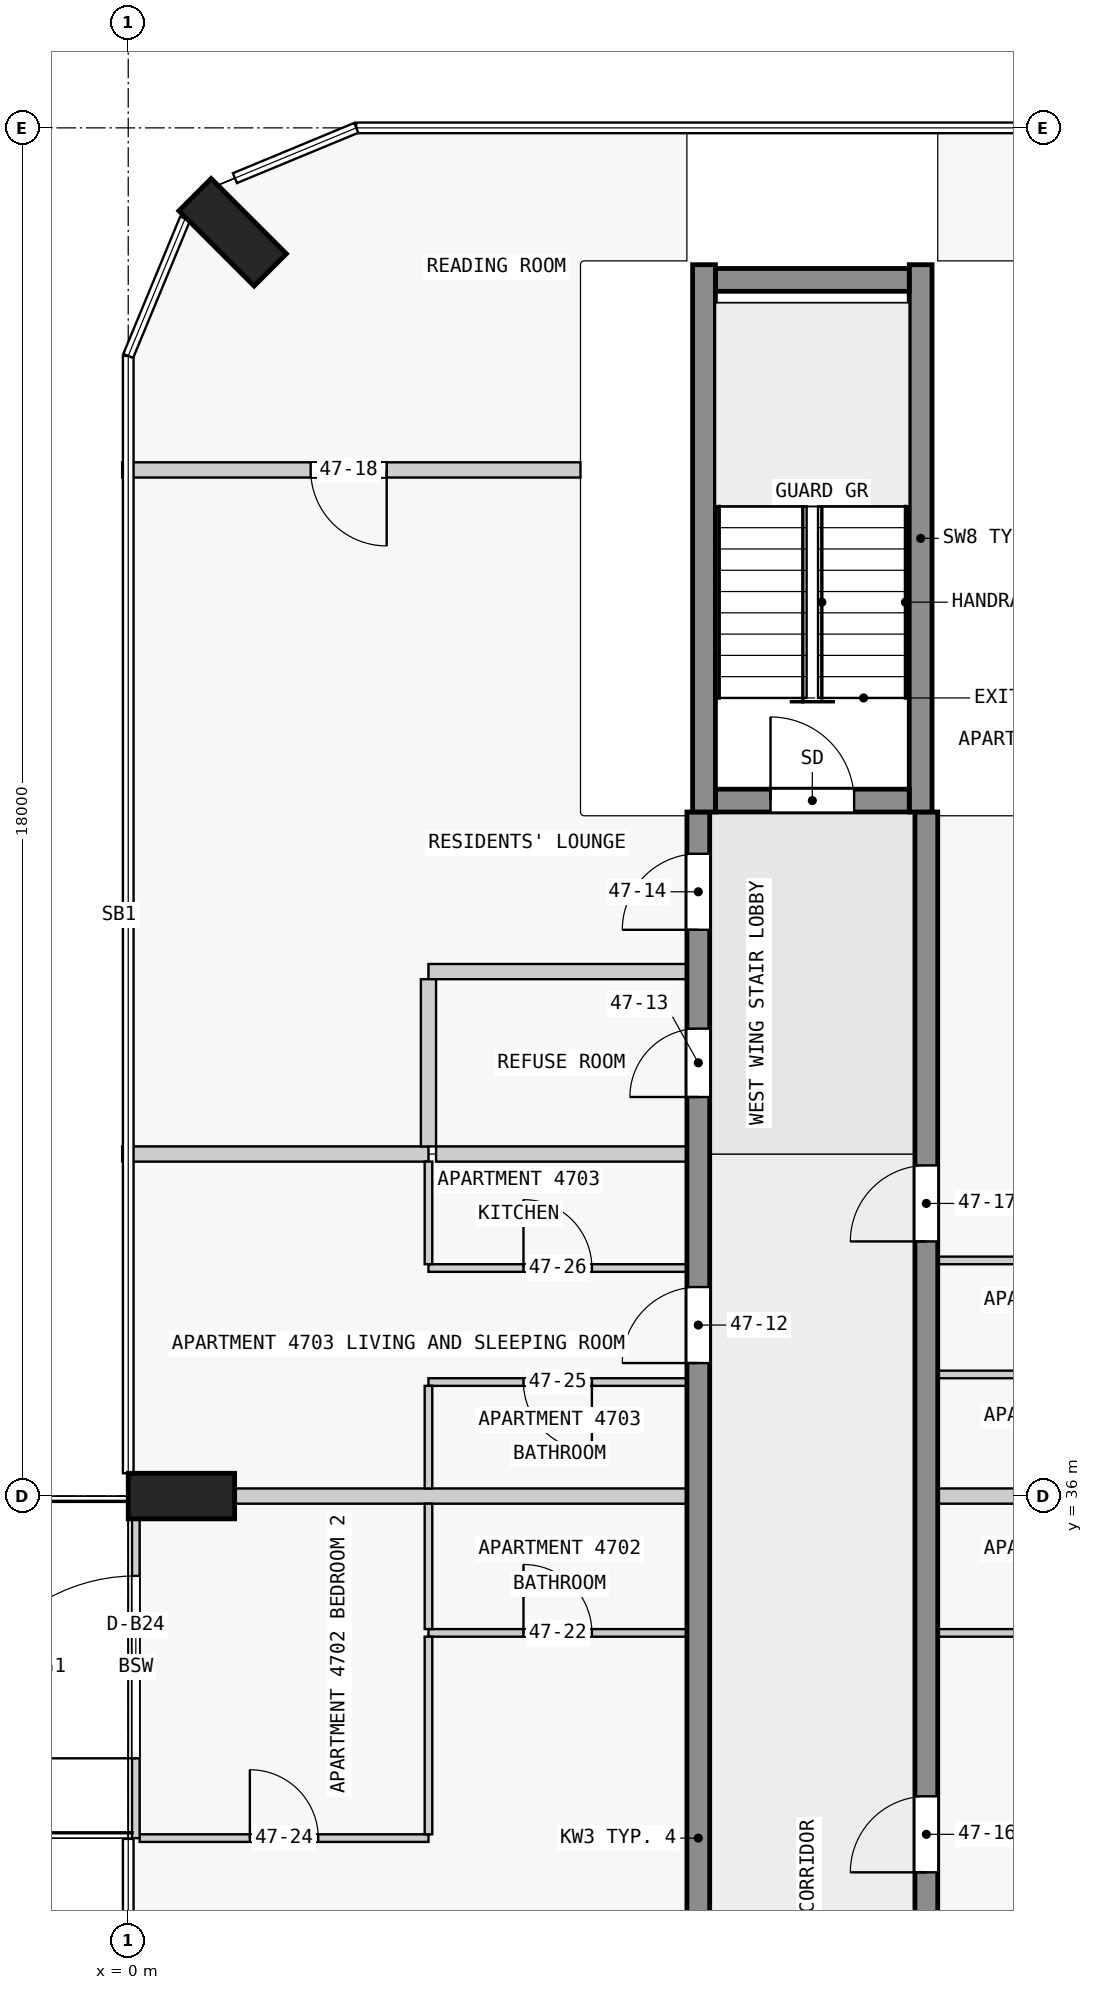
"""IFC4 building model, lengths in metres.
Left out: names, types, materials, properties, quantities, classifications, styles, units other than length and angle.
Written with IfcOpenShell. Run it as: python <this file> out.ifc"""

import sys

from ifc_helpers import new_model, si_unit, direction, frame, frame_2d, origin, origin_2d, place, context, subcontext, project, spatial, rectangle, extrude, element, fill, save


model = new_model("IFC4")
c1 = context("Model", 3, precision=1e-05, world=origin(), true_north=direction((0.0, 1.0)))
c2 = subcontext(c1, "Body", "Model", "MODEL_VIEW")
j1 = project(units=[si_unit("LENGTHUNIT", "METRE"), si_unit("PLANEANGLEUNIT", "RADIAN")], contexts=[c1])
p1 = place(None, origin())
s1 = spatial("IfcSite", under=j1, at=p1, CompositionType="ELEMENT")
p2 = place(p1, origin())
s2 = spatial("IfcBuilding", under=s1, at=p2, CompositionType="ELEMENT")
p3 = place(p2, frame((0.0, 0.0, 181.4)))
s3 = spatial("IfcBuildingStorey", under=s2, at=p3, CompositionType="ELEMENT", Elevation=181.4)
for number, where, z_axis, x_axis in (
    (1, (1.374, 52.626, 0.0), (0.0, 0.0, 1.0), (0.707, 0.707, 0.0)),
    (2, (0.7, 36.0, 0.0), (0.0, 0.0, 1.0), (0.0, 1.0, 0.0)),
):
    element("IfcColumn", number, at=place(p3, frame(where, z_axis=z_axis, x_axis=x_axis)), inside=s3, PredefinedType="COLUMN", context=c2, shape_type="SweptSolid", body=[
        extrude(rectangle(XDim=0.6, YDim=1.4, at=origin_2d()), origin(), (0.0, 0.0, 1.0), 3.5),
    ])
p4 = place(p3, frame((7.725, 45.15, 0.0), z_axis=(0.0, 0.0, 1.0), x_axis=(1.0, 0.0, 0.0)))
e3 = element("IfcWall", 3, at=p4, inside=s3, PredefinedType="SHEAR", context=c2, shape_type="SweptSolid", body=[
    extrude(rectangle(XDim=2.55, YDim=0.3, at=frame_2d((1.275, 0.0))), origin(), (0.0, 0.0, 1.0), 3.5),
])
p5 = place(p4, frame((0.725, 0.0, 0.0)))
e4 = element("IfcOpeningElement", 4, at=p5, cuts=e3, PredefinedType="OPENING", context=c2, shape_type="SweptSolid", body=[
    extrude(rectangle(XDim=1.1, YDim=2.1, at=frame_2d((0.55, 1.05))), frame((0.0, 0.16, 0.0), z_axis=(0.0, -1.0, 0.0), x_axis=(1.0, 0.0, 0.0)), (0.0, 0.0, 1.0), 0.32),
])
p6 = place(p3, frame((7.725, 52.0, 0.0), z_axis=(0.0, 0.0, 1.0), x_axis=(1.0, 0.0, 0.0)))
e5 = element("IfcWall", 5, at=p6, inside=s3, PredefinedType="SHEAR", context=c2, shape_type="SweptSolid", body=[
    extrude(rectangle(XDim=2.55, YDim=0.3, at=frame_2d((1.275, 0.0))), origin(), (0.0, 0.0, 1.0), 3.5),
])
for number, where, z_axis, x_axis in (
    (6, (7.575, 45.0, 0.0), (0.0, 0.0, 1.0), (0.0, 1.0, 0.0)),
    (7, (10.425, 45.0, 0.0), (0.0, 0.0, 1.0), (0.0, 1.0, 0.0)),
):
    element("IfcWall", number, at=place(p3, frame(where, z_axis=z_axis, x_axis=x_axis)), inside=s3, PredefinedType="SHEAR", context=c2, shape_type="SweptSolid", body=[
        extrude(rectangle(XDim=7.2, YDim=0.3, at=frame_2d((3.6, 0.0))), origin(), (0.0, 0.0, 1.0), 3.5),
    ])
p7 = place(p3, frame((7.5, 18.0, 0.0), z_axis=(0.0, 0.0, 1.0), x_axis=(0.0, 1.0, 0.0)))
e8 = element("IfcWall", 8, at=p7, inside=s3, PredefinedType="SHEAR", context=c2, shape_type="SweptSolid", body=[
    extrude(rectangle(XDim=27.0, YDim=0.3, at=frame_2d((13.5, 0.0))), origin(), (0.0, 0.0, 1.0), 3.2),
])
p8 = place(p7, frame((1.75, 0.0, 0.0)))
e9 = element("IfcOpeningElement", 9, at=p8, cuts=e8, PredefinedType="OPENING", context=c2, shape_type="SweptSolid", body=[
    extrude(rectangle(XDim=1.0, YDim=2.1, at=frame_2d((0.5, 1.05))), frame((0.0, 0.16, 0.0), z_axis=(0.0, -1.0, 0.0), x_axis=(1.0, 0.0, 0.0)), (0.0, 0.0, 1.0), 0.32),
])
p9 = place(p7, frame((11.45, 0.0, 0.0)))
e10 = element("IfcOpeningElement", 10, at=p9, cuts=e8, PredefinedType="OPENING", context=c2, shape_type="SweptSolid", body=[
    extrude(rectangle(XDim=1.0, YDim=2.1, at=frame_2d((0.5, 1.05))), frame((0.0, 0.16, 0.0), z_axis=(0.0, -1.0, 0.0), x_axis=(1.0, 0.0, 0.0)), (0.0, 0.0, 1.0), 0.32),
])
p10 = place(p7, frame((19.75, 0.0, 0.0)))
e11 = element("IfcOpeningElement", 11, at=p10, cuts=e8, PredefinedType="OPENING", context=c2, shape_type="SweptSolid", body=[
    extrude(rectangle(XDim=1.0, YDim=2.1, at=frame_2d((0.5, 1.05))), frame((0.0, 0.16, 0.0), z_axis=(0.0, -1.0, 0.0), x_axis=(1.0, 0.0, 0.0)), (0.0, 0.0, 1.0), 0.32),
])
p11 = place(p7, frame((23.25, 0.0, 0.0)))
e12 = element("IfcOpeningElement", 12, at=p11, cuts=e8, PredefinedType="OPENING", context=c2, shape_type="SweptSolid", body=[
    extrude(rectangle(XDim=0.9, YDim=2.1, at=frame_2d((0.45, 1.05))), frame((0.0, 0.16, 0.0), z_axis=(0.0, -1.0, 0.0), x_axis=(1.0, 0.0, 0.0)), (0.0, 0.0, 1.0), 0.32),
])
p12 = place(p7, frame((25.45, 0.0, 0.0)))
e13 = element("IfcOpeningElement", 13, at=p12, cuts=e8, PredefinedType="OPENING", context=c2, shape_type="SweptSolid", body=[
    extrude(rectangle(XDim=1.0, YDim=2.1, at=frame_2d((0.5, 1.05))), frame((0.0, 0.16, 0.0), z_axis=(0.0, -1.0, 0.0), x_axis=(1.0, 0.0, 0.0)), (0.0, 0.0, 1.0), 0.32),
])
p13 = place(p3, frame((10.5, 18.0, 0.0), z_axis=(0.0, 0.0, 1.0), x_axis=(0.0, 1.0, 0.0)))
e14 = element("IfcWall", 14, at=p13, inside=s3, PredefinedType="SHEAR", context=c2, shape_type="SweptSolid", body=[
    extrude(rectangle(XDim=27.0, YDim=0.3, at=frame_2d((13.5, 0.0))), origin(), (0.0, 0.0, 1.0), 3.2),
])
p14 = place(p13, frame((4.05, 0.0, 0.0)))
e15 = element("IfcOpeningElement", 15, at=p14, cuts=e14, PredefinedType="OPENING", context=c2, shape_type="SweptSolid", body=[
    extrude(rectangle(XDim=1.0, YDim=2.1, at=frame_2d((0.5, 1.05))), frame((0.0, 0.16, 0.0), z_axis=(0.0, -1.0, 0.0), x_axis=(1.0, 0.0, 0.0)), (0.0, 0.0, 1.0), 0.32),
])
p15 = place(p13, frame((13.05, 0.0, 0.0)))
e16 = element("IfcOpeningElement", 16, at=p15, cuts=e14, PredefinedType="OPENING", context=c2, shape_type="SweptSolid", body=[
    extrude(rectangle(XDim=1.0, YDim=2.1, at=frame_2d((0.5, 1.05))), frame((0.0, 0.16, 0.0), z_axis=(0.0, -1.0, 0.0), x_axis=(1.0, 0.0, 0.0)), (0.0, 0.0, 1.0), 0.32),
])
p16 = place(p13, frame((21.35, 0.0, 0.0)))
e17 = element("IfcOpeningElement", 17, at=p16, cuts=e14, PredefinedType="OPENING", context=c2, shape_type="SweptSolid", body=[
    extrude(rectangle(XDim=1.0, YDim=2.1, at=frame_2d((0.5, 1.05))), frame((0.0, 0.16, 0.0), z_axis=(0.0, -1.0, 0.0), x_axis=(1.0, 0.0, 0.0)), (0.0, 0.0, 1.0), 0.32),
])
p17 = place(p3, frame((0.1, 31.5, 0.0), z_axis=(0.0, 0.0, 1.0), x_axis=(0.0, 1.0, 0.0)))
e18 = element("IfcWall", 18, at=p17, inside=s3, PredefinedType="STANDARD", context=c2, shape_type="SweptSolid", body=[
    extrude(rectangle(XDim=4.5, YDim=0.1, at=frame_2d((2.25, 0.0))), origin(), (0.0, 0.0, 1.0), 3.2),
])
p18 = place(p17, frame((1.05, 0.0, 0.0)))
e19 = element("IfcOpeningElement", 19, at=p18, cuts=e18, PredefinedType="OPENING", context=c2, shape_type="SweptSolid", body=[
    extrude(rectangle(XDim=2.4, YDim=2.4, at=frame_2d((1.2, 1.2))), frame((0.0, 0.06, 0.0), z_axis=(0.0, -1.0, 0.0), x_axis=(1.0, 0.0, 0.0)), (0.0, 0.0, 1.0), 0.12),
])
p19 = place(p3, frame((0.15, 31.5, 0.0), z_axis=(0.0, 0.0, 1.0), x_axis=(1.0, 0.0, 0.0)))
e20 = element("IfcWall", 20, at=p19, inside=s3, PredefinedType="PARTITIONING", context=c2, shape_type="SweptSolid", body=[
    extrude(rectangle(XDim=3.8, YDim=0.1, at=frame_2d((1.9, 0.0))), origin(), (0.0, 0.0, 1.0), 3.2),
])
p20 = place(p19, frame((1.45, 0.0, 0.0)))
e21 = element("IfcOpeningElement", 21, at=p20, cuts=e20, PredefinedType="OPENING", context=c2, shape_type="SweptSolid", body=[
    extrude(rectangle(XDim=0.9, YDim=2.1, at=frame_2d((0.45, 1.05))), frame((0.0, 0.06, 0.0), z_axis=(0.0, -1.0, 0.0), x_axis=(1.0, 0.0, 0.0)), (0.0, 0.0, 1.0), 0.12),
])
p21 = place(p3, frame((3.95, 34.2, 0.0), z_axis=(0.0, 0.0, 1.0), x_axis=(1.0, 0.0, 0.0)))
e22 = element("IfcWall", 22, at=p21, inside=s3, PredefinedType="PARTITIONING", context=c2, shape_type="SweptSolid", body=[
    extrude(rectangle(XDim=3.4, YDim=0.1, at=frame_2d((1.7, 0.0))), origin(), (0.0, 0.0, 1.0), 3.2),
])
p22 = place(p21, frame((1.25, 0.0, 0.0)))
e23 = element("IfcOpeningElement", 23, at=p22, cuts=e22, PredefinedType="OPENING", context=c2, shape_type="SweptSolid", body=[
    extrude(rectangle(XDim=0.9, YDim=2.1, at=frame_2d((0.45, 1.05))), frame((0.0, 0.06, 0.0), z_axis=(0.0, -1.0, 0.0), x_axis=(1.0, 0.0, 0.0)), (0.0, 0.0, 1.0), 0.12),
])
p23 = place(p3, frame((10.65, 34.2, 0.0), z_axis=(0.0, 0.0, 1.0), x_axis=(1.0, 0.0, 0.0)))
e24 = element("IfcWall", 24, at=p23, inside=s3, PredefinedType="PARTITIONING", context=c2, shape_type="SweptSolid", body=[
    extrude(rectangle(XDim=3.35, YDim=0.1, at=frame_2d((1.675, 0.0))), origin(), (0.0, 0.0, 1.0), 3.2),
])
p24 = place(p23, frame((1.25, 0.0, 0.0)))
e25 = element("IfcOpeningElement", 25, at=p24, cuts=e24, PredefinedType="OPENING", context=c2, shape_type="SweptSolid", body=[
    extrude(rectangle(XDim=0.9, YDim=2.1, at=frame_2d((0.45, 1.05))), frame((0.0, 0.06, 0.0), z_axis=(0.0, -1.0, 0.0), x_axis=(1.0, 0.0, 0.0)), (0.0, 0.0, 1.0), 0.12),
])
for number, where, z_axis, x_axis in (
    (26, (7.35, 36.0, 0.0), (0.0, 0.0, 1.0), (-1.0, 0.0, 0.0)),
    (27, (16.6, 36.0, 0.0), (0.0, 0.0, 1.0), (-1.0, 0.0, 0.0)),
):
    element("IfcWall", number, at=place(p3, frame(where, z_axis=z_axis, x_axis=x_axis)), inside=s3, PredefinedType="PARTITIONING", context=c2, shape_type="SweptSolid", body=[
        extrude(rectangle(XDim=5.95, YDim=0.2, at=frame_2d((2.975, 0.0))), origin(), (0.0, 0.0, 1.0), 3.2),
    ])
p25 = place(p3, frame((7.35, 37.5, 0.0), z_axis=(0.0, 0.0, 1.0), x_axis=(-1.0, 0.0, 0.0)))
e28 = element("IfcWall", 28, at=p25, inside=s3, PredefinedType="PARTITIONING", context=c2, shape_type="SweptSolid", body=[
    extrude(rectangle(XDim=3.4, YDim=0.1, at=frame_2d((1.7, 0.0))), origin(), (0.0, 0.0, 1.0), 3.2),
])
p26 = place(p25, frame((1.25, 0.0, 0.0)))
e29 = element("IfcOpeningElement", 29, at=p26, cuts=e28, PredefinedType="OPENING", context=c2, shape_type="SweptSolid", body=[
    extrude(rectangle(XDim=0.9, YDim=2.1, at=frame_2d((0.45, 1.05))), frame((0.0, 0.06, 0.0), z_axis=(0.0, -1.0, 0.0), x_axis=(1.0, 0.0, 0.0)), (0.0, 0.0, 1.0), 0.12),
])
p27 = place(p3, frame((14.0, 37.6, 0.0), z_axis=(0.0, 0.0, 1.0), x_axis=(-1.0, 0.0, 0.0)))
e30 = element("IfcWall", 30, at=p27, inside=s3, PredefinedType="PARTITIONING", context=c2, shape_type="SweptSolid", body=[
    extrude(rectangle(XDim=3.35, YDim=0.1, at=frame_2d((1.675, 0.0))), origin(), (0.0, 0.0, 1.0), 3.2),
])
p28 = place(p3, frame((3.95, 39.0, 0.0), z_axis=(0.0, 0.0, 1.0), x_axis=(1.0, 0.0, 0.0)))
e31 = element("IfcWall", 31, at=p28, inside=s3, PredefinedType="PARTITIONING", context=c2, shape_type="SweptSolid", body=[
    extrude(rectangle(XDim=3.4, YDim=0.1, at=frame_2d((1.7, 0.0))), origin(), (0.0, 0.0, 1.0), 3.2),
])
p29 = place(p28, frame((1.25, 0.0, 0.0)))
e32 = element("IfcOpeningElement", 32, at=p29, cuts=e31, PredefinedType="OPENING", context=c2, shape_type="SweptSolid", body=[
    extrude(rectangle(XDim=0.9, YDim=2.1, at=frame_2d((0.45, 1.05))), frame((0.0, 0.06, 0.0), z_axis=(0.0, -1.0, 0.0), x_axis=(1.0, 0.0, 0.0)), (0.0, 0.0, 1.0), 0.12),
])
p30 = place(p3, frame((14.0, 39.1, 0.0), z_axis=(0.0, 0.0, 1.0), x_axis=(-1.0, 0.0, 0.0)))
e33 = element("IfcWall", 33, at=p30, inside=s3, PredefinedType="PARTITIONING", context=c2, shape_type="SweptSolid", body=[
    extrude(rectangle(XDim=3.35, YDim=0.1, at=frame_2d((1.675, 0.0))), origin(), (0.0, 0.0, 1.0), 3.2),
])
p31 = place(p30, frame((1.25, 0.0, 0.0)))
e34 = element("IfcOpeningElement", 34, at=p31, cuts=e33, PredefinedType="OPENING", context=c2, shape_type="SweptSolid", body=[
    extrude(rectangle(XDim=0.9, YDim=2.1, at=frame_2d((0.45, 1.05))), frame((0.0, 0.06, 0.0), z_axis=(0.0, -1.0, 0.0), x_axis=(1.0, 0.0, 0.0)), (0.0, 0.0, 1.0), 0.12),
])
p32 = place(p3, frame((7.35, 40.5, 0.0), z_axis=(0.0, 0.0, 1.0), x_axis=(-1.0, 0.0, 0.0)))
e35 = element("IfcWall", 35, at=p32, inside=s3, PredefinedType="PARTITIONING", context=c2, shape_type="SweptSolid", body=[
    extrude(rectangle(XDim=3.3, YDim=0.2, at=frame_2d((1.65, 0.0))), origin(), (0.0, 0.0, 1.0), 3.2),
])
p33 = place(p3, frame((-0.08, 40.5, 0.0), z_axis=(0.0, 0.0, 1.0), x_axis=(1.0, 0.0, 0.0)))
e36 = element("IfcWall", 36, at=p33, inside=s3, PredefinedType="PARTITIONING", context=c2, shape_type="SweptSolid", body=[
    extrude(rectangle(XDim=4.03, YDim=0.2, at=frame_2d((2.015, 0.0))), origin(), (0.0, 0.0, 1.0), 3.2),
])
p34 = place(p3, frame((7.35, 42.9, 0.0), z_axis=(0.0, 0.0, 1.0), x_axis=(-1.0, 0.0, 0.0)))
e37 = element("IfcWall", 37, at=p34, inside=s3, PredefinedType="PARTITIONING", context=c2, shape_type="SweptSolid", body=[
    extrude(rectangle(XDim=3.4, YDim=0.2, at=frame_2d((1.7, 0.0))), origin(), (0.0, 0.0, 1.0), 3.2),
])
p35 = place(p3, frame((5.95, 49.5, 0.0), z_axis=(0.0, 0.0, 1.0), x_axis=(-1.0, 0.0, 0.0)))
e38 = element("IfcWall", 38, at=p35, inside=s3, PredefinedType="PARTITIONING", context=c2, shape_type="SweptSolid", body=[
    extrude(rectangle(XDim=6.03, YDim=0.2, at=frame_2d((3.015, 0.0))), origin(), (0.0, 0.0, 1.0), 3.2),
])
p36 = place(p35, frame((2.55, 0.0, 0.0)))
e39 = element("IfcOpeningElement", 39, at=p36, cuts=e38, PredefinedType="OPENING", context=c2, shape_type="SweptSolid", body=[
    extrude(rectangle(XDim=1.0, YDim=2.1, at=frame_2d((0.5, 1.05))), frame((0.0, 0.11, 0.0), z_axis=(0.0, -1.0, 0.0), x_axis=(1.0, 0.0, 0.0)), (0.0, 0.0, 1.0), 0.22),
])
p37 = place(p3, frame((3.95, 35.9, 0.0), z_axis=(0.0, 0.0, 1.0), x_axis=(0.0, -1.0, 0.0)))
e40 = element("IfcWall", 40, at=p37, inside=s3, PredefinedType="PARTITIONING", context=c2, shape_type="SweptSolid", body=[
    extrude(rectangle(XDim=1.65, YDim=0.1, at=frame_2d((0.825, 0.0))), origin(), (0.0, 0.0, 1.0), 3.2),
])
for number, where, z_axis, x_axis in (
    (41, (3.95, 37.45, 0.0), (0.0, 0.0, 1.0), (0.0, -1.0, 0.0)),
    (42, (3.95, 40.4, 0.0), (0.0, 0.0, 1.0), (0.0, -1.0, 0.0)),
):
    element("IfcWall", number, at=place(p3, frame(where, z_axis=z_axis, x_axis=x_axis)), inside=s3, PredefinedType="PARTITIONING", context=c2, shape_type="SweptSolid", body=[
        extrude(rectangle(XDim=1.35, YDim=0.1, at=frame_2d((0.675, 0.0))), origin(), (0.0, 0.0, 1.0), 3.2),
    ])
p38 = place(p3, frame((3.95, 31.55, 0.0), z_axis=(0.0, 0.0, 1.0), x_axis=(0.0, 1.0, 0.0)))
e43 = element("IfcWall", 43, at=p38, inside=s3, PredefinedType="PARTITIONING", context=c2, shape_type="SweptSolid", body=[
    extrude(rectangle(XDim=2.6, YDim=0.1, at=frame_2d((1.3, 0.0))), origin(), (0.0, 0.0, 1.0), 3.2),
])
p39 = place(p3, frame((3.95, 42.8, 0.0), z_axis=(0.0, 0.0, 1.0), x_axis=(0.0, -1.0, 0.0)))
e44 = element("IfcWall", 44, at=p39, inside=s3, PredefinedType="PARTITIONING", context=c2, shape_type="SweptSolid", body=[
    extrude(rectangle(XDim=2.2, YDim=0.2, at=frame_2d((1.1, 0.0))), origin(), (0.0, 0.0, 1.0), 3.2),
])
p40 = place(p18, origin())
e45 = element("IfcDoor", 45, at=p40, inside=s3, OperationType="SINGLE_SWING_LEFT", PredefinedType="DOOR", context=c2, shape_type="SweptSolid", body=[
    extrude(rectangle(XDim=2.4, YDim=2.4, at=frame_2d((1.2, 1.2))), frame((0.0, 0.025, 0.0), z_axis=(0.0, -1.0, 0.0), x_axis=(1.0, 0.0, 0.0)), (0.0, 0.0, 1.0), 0.05),
])
fill(e19, e45)
p41 = place(p5, origin())
e46 = element("IfcDoor", 46, at=p41, inside=s3, OperationType="SINGLE_SWING_LEFT", PredefinedType="DOOR", context=c2, shape_type="SweptSolid", body=[
    extrude(rectangle(XDim=1.1, YDim=2.1, at=frame_2d((0.55, 1.05))), frame((0.0, 0.025, 0.0), z_axis=(0.0, -1.0, 0.0), x_axis=(1.0, 0.0, 0.0)), (0.0, 0.0, 1.0), 0.05),
])
fill(e4, e46)
p42 = place(p10, origin())
e47 = element("IfcDoor", 47, at=p42, inside=s3, OperationType="SINGLE_SWING_RIGHT", PredefinedType="DOOR", context=c2, shape_type="SweptSolid", body=[
    extrude(rectangle(XDim=1.0, YDim=2.1, at=frame_2d((0.5, 1.05))), frame((0.0, 0.025, 0.0), z_axis=(0.0, -1.0, 0.0), x_axis=(1.0, 0.0, 0.0)), (0.0, 0.0, 1.0), 0.05),
])
fill(e11, e47)
p43 = place(p11, origin())
e48 = element("IfcDoor", 48, at=p43, inside=s3, OperationType="SINGLE_SWING_RIGHT", PredefinedType="DOOR", context=c2, shape_type="SweptSolid", body=[
    extrude(rectangle(XDim=0.9, YDim=2.1, at=frame_2d((0.45, 1.05))), frame((0.0, 0.025, 0.0), z_axis=(0.0, -1.0, 0.0), x_axis=(1.0, 0.0, 0.0)), (0.0, 0.0, 1.0), 0.05),
])
fill(e12, e48)
p44 = place(p12, origin())
e49 = element("IfcDoor", 49, at=p44, inside=s3, OperationType="SINGLE_SWING_RIGHT", PredefinedType="DOOR", context=c2, shape_type="SweptSolid", body=[
    extrude(rectangle(XDim=1.0, YDim=2.1, at=frame_2d((0.5, 1.05))), frame((0.0, 0.025, 0.0), z_axis=(0.0, -1.0, 0.0), x_axis=(1.0, 0.0, 0.0)), (0.0, 0.0, 1.0), 0.05),
])
fill(e13, e49)
p45 = place(p15, origin())
e50 = element("IfcDoor", 50, at=p45, inside=s3, OperationType="SINGLE_SWING_RIGHT", PredefinedType="DOOR", context=c2, shape_type="SweptSolid", body=[
    extrude(rectangle(XDim=1.0, YDim=2.1, at=frame_2d((0.5, 1.05))), frame((0.0, 0.025, 0.0), z_axis=(0.0, -1.0, 0.0), x_axis=(1.0, 0.0, 0.0)), (0.0, 0.0, 1.0), 0.05),
])
fill(e16, e50)
p46 = place(p16, origin())
e51 = element("IfcDoor", 51, at=p46, inside=s3, OperationType="SINGLE_SWING_RIGHT", PredefinedType="DOOR", context=c2, shape_type="SweptSolid", body=[
    extrude(rectangle(XDim=1.0, YDim=2.1, at=frame_2d((0.5, 1.05))), frame((0.0, 0.025, 0.0), z_axis=(0.0, -1.0, 0.0), x_axis=(1.0, 0.0, 0.0)), (0.0, 0.0, 1.0), 0.05),
])
fill(e17, e51)
p47 = place(p36, origin())
e52 = element("IfcDoor", 52, at=p47, inside=s3, OperationType="SINGLE_SWING_RIGHT", PredefinedType="DOOR", context=c2, shape_type="SweptSolid", body=[
    extrude(rectangle(XDim=1.0, YDim=2.1, at=frame_2d((0.5, 1.05))), frame((0.0, 0.025, 0.0), z_axis=(0.0, -1.0, 0.0), x_axis=(1.0, 0.0, 0.0)), (0.0, 0.0, 1.0), 0.05),
])
fill(e39, e52)
p48 = place(p22, origin())
e53 = element("IfcDoor", 53, at=p48, inside=s3, OperationType="SINGLE_SWING_RIGHT", PredefinedType="DOOR", context=c2, shape_type="SweptSolid", body=[
    extrude(rectangle(XDim=0.9, YDim=2.1, at=frame_2d((0.45, 1.05))), frame((0.0, 0.025, 0.0), z_axis=(0.0, -1.0, 0.0), x_axis=(1.0, 0.0, 0.0)), (0.0, 0.0, 1.0), 0.05),
])
fill(e23, e53)
p49 = place(p20, origin())
e54 = element("IfcDoor", 54, at=p49, inside=s3, OperationType="SINGLE_SWING_LEFT", PredefinedType="DOOR", context=c2, shape_type="SweptSolid", body=[
    extrude(rectangle(XDim=0.9, YDim=2.1, at=frame_2d((0.45, 1.05))), frame((0.0, 0.025, 0.0), z_axis=(0.0, -1.0, 0.0), x_axis=(1.0, 0.0, 0.0)), (0.0, 0.0, 1.0), 0.05),
])
fill(e21, e54)
p50 = place(p26, origin())
e55 = element("IfcDoor", 55, at=p50, inside=s3, OperationType="SINGLE_SWING_RIGHT", PredefinedType="DOOR", context=c2, shape_type="SweptSolid", body=[
    extrude(rectangle(XDim=0.9, YDim=2.1, at=frame_2d((0.45, 1.05))), frame((0.0, 0.025, 0.0), z_axis=(0.0, -1.0, 0.0), x_axis=(1.0, 0.0, 0.0)), (0.0, 0.0, 1.0), 0.05),
])
fill(e29, e55)
p51 = place(p29, origin())
e56 = element("IfcDoor", 56, at=p51, inside=s3, OperationType="SINGLE_SWING_RIGHT", PredefinedType="DOOR", context=c2, shape_type="SweptSolid", body=[
    extrude(rectangle(XDim=0.9, YDim=2.1, at=frame_2d((0.45, 1.05))), frame((0.0, 0.025, 0.0), z_axis=(0.0, -1.0, 0.0), x_axis=(1.0, 0.0, 0.0)), (0.0, 0.0, 1.0), 0.05),
])
fill(e32, e56)
save(model, sys.argv[1])
